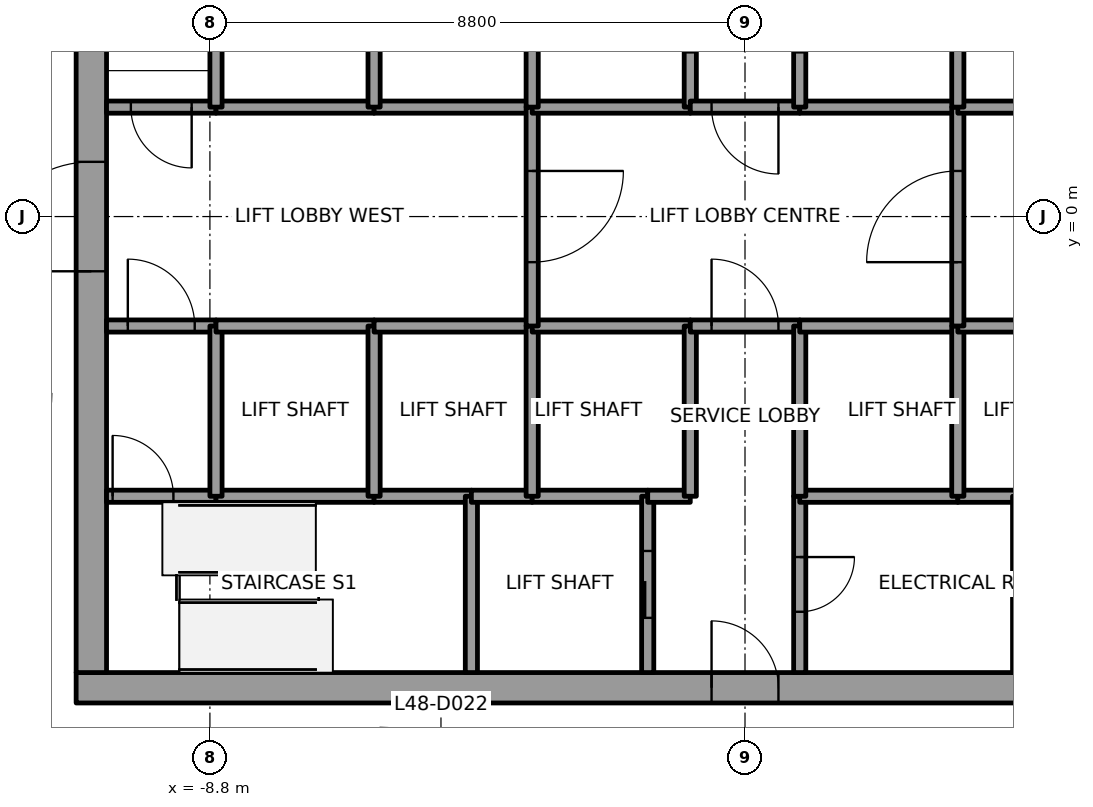
"""IFC4 building model, lengths in metres.
Left out: names, types, materials, properties, quantities, classifications, styles, units other than length and angle.
Written with IfcOpenShell. Run it as: python <this file> out.ifc"""

import sys

from ifc_helpers import new_model, si_unit, direction, frame, frame_2d, origin, place, context, subcontext, project, spatial, rectangle, extrude, element, fill, save


model = new_model("IFC4")
c1 = context("Model", 3, precision=1e-05, world=origin(), true_north=direction((0.0, 1.0)))
c2 = subcontext(c1, "Body", "Model", "MODEL_VIEW")
j1 = project(units=[si_unit("LENGTHUNIT", "METRE"), si_unit("PLANEANGLEUNIT", "RADIAN")], contexts=[c1])
p1 = place(None, origin())
s1 = spatial("IfcSite", under=j1, at=p1, CompositionType="ELEMENT")
p2 = place(p1, origin())
s2 = spatial("IfcBuilding", under=s1, at=p2, CompositionType="ELEMENT")
p3 = place(p2, frame((0.0, 0.0, 213.8)))
s3 = spatial("IfcBuildingStorey", under=s2, at=p3, CompositionType="ELEMENT", Elevation=213.8)
p4 = place(p3, frame((-11.0, -7.75, 0.0), z_axis=(0.0, 0.0, 1.0), x_axis=(1.0, 0.0, 0.0)))
e1 = element("IfcWall", 1, at=p4, inside=s3, PredefinedType="SHEAR", context=c2, shape_type="SweptSolid", body=[
    extrude(rectangle(XDim=22.0, YDim=0.5, at=frame_2d((11.0, 0.0))), origin(), (0.0, 0.0, 1.0), 6.0),
])
p5 = place(p4, frame((10.45, 0.0, 0.0)))
e2 = element("IfcOpeningElement", 2, at=p5, cuts=e1, PredefinedType="OPENING", context=c2, shape_type="SweptSolid", body=[
    extrude(rectangle(XDim=1.1, YDim=2.1, at=frame_2d((0.55, 1.05))), frame((0.0, 0.25, 0.0), z_axis=(0.0, -1.0, 0.0), x_axis=(1.0, 0.0, 0.0)), (0.0, 0.0, 1.0), 0.5),
])
p6 = place(p3, frame((-10.75, -7.5, 0.0), z_axis=(0.0, 0.0, 1.0), x_axis=(0.0, 1.0, 0.0)))
e3 = element("IfcWall", 3, at=p6, inside=s3, PredefinedType="SHEAR", context=c2, shape_type="SweptSolid", body=[
    extrude(rectangle(XDim=15.0, YDim=0.5, at=frame_2d((7.5, 0.0))), origin(), (0.0, 0.0, 1.0), 6.0),
])
p7 = place(p6, frame((6.6, 0.0, 0.0)))
e4 = element("IfcOpeningElement", 4, at=p7, cuts=e3, PredefinedType="OPENING", context=c2, shape_type="SweptSolid", body=[
    extrude(rectangle(XDim=1.8, YDim=2.1, at=frame_2d((0.9, 1.05))), frame((0.0, 0.25, 0.0), z_axis=(0.0, -1.0, 0.0), x_axis=(1.0, 0.0, 0.0)), (0.0, 0.0, 1.0), 0.5),
])
p8 = place(p3, frame((-10.5, -4.6, 0.0), z_axis=(0.0, 0.0, 1.0), x_axis=(1.0, 0.0, 0.0)))
e5 = element("IfcWall", 5, at=p8, inside=s3, PredefinedType="SOLIDWALL", context=c2, shape_type="SweptSolid", body=[
    extrude(rectangle(XDim=1.8, YDim=0.2, at=frame_2d((0.9, 0.0))), origin(), (0.0, 0.0, 1.0), 5.85),
])
p9 = place(p8, frame((0.1, 0.0, 0.0)))
e6 = element("IfcOpeningElement", 6, at=p9, cuts=e5, PredefinedType="OPENING", context=c2, shape_type="SweptSolid", body=[
    extrude(rectangle(XDim=1.0, YDim=2.1, at=frame_2d((0.5, 1.05))), frame((0.0, 0.1, 0.0), z_axis=(0.0, -1.0, 0.0), x_axis=(1.0, 0.0, 0.0)), (0.0, 0.0, 1.0), 0.2),
])
p10 = place(p3, frame((-10.5, -1.8, 0.0), z_axis=(0.0, 0.0, 1.0), x_axis=(1.0, 0.0, 0.0)))
e7 = element("IfcWall", 7, at=p10, inside=s3, PredefinedType="SOLIDWALL", context=c2, shape_type="SweptSolid", body=[
    extrude(rectangle(XDim=1.8, YDim=0.2, at=frame_2d((0.9, 0.0))), origin(), (0.0, 0.0, 1.0), 5.85),
])
p11 = place(p10, frame((0.35, 0.0, 0.0)))
e8 = element("IfcOpeningElement", 8, at=p11, cuts=e7, PredefinedType="OPENING", context=c2, shape_type="SweptSolid", body=[
    extrude(rectangle(XDim=1.1, YDim=2.1, at=frame_2d((0.55, 1.05))), frame((0.0, 0.1, 0.0), z_axis=(0.0, -1.0, 0.0), x_axis=(1.0, 0.0, 0.0)), (0.0, 0.0, 1.0), 0.2),
])
p12 = place(p3, frame((-8.7, 1.8, 0.0), z_axis=(0.0, 0.0, 1.0), x_axis=(-1.0, 0.0, 0.0)))
e9 = element("IfcWall", 9, at=p12, inside=s3, PredefinedType="SOLIDWALL", context=c2, shape_type="SweptSolid", body=[
    extrude(rectangle(XDim=1.8, YDim=0.2, at=frame_2d((0.9, 0.0))), origin(), (0.0, 0.0, 1.0), 5.85),
])
p13 = place(p12, frame((0.4, 0.0, 0.0)))
e10 = element("IfcOpeningElement", 10, at=p13, cuts=e9, PredefinedType="OPENING", context=c2, shape_type="SweptSolid", body=[
    extrude(rectangle(XDim=1.0, YDim=2.1, at=frame_2d((0.5, 1.05))), frame((0.0, 0.1, 0.0), z_axis=(0.0, -1.0, 0.0), x_axis=(1.0, 0.0, 0.0)), (0.0, 0.0, 1.0), 0.2),
])
p14 = place(p3, frame((-8.7, -4.6, 0.0), z_axis=(0.0, 0.0, 1.0), x_axis=(1.0, 0.0, 0.0)))
e11 = element("IfcWall", 11, at=p14, inside=s3, PredefinedType="SOLIDWALL", context=c2, shape_type="SweptSolid", body=[
    extrude(rectangle(XDim=2.6, YDim=0.2, at=frame_2d((1.3, 0.0))), origin(), (0.0, 0.0, 1.0), 5.85),
])
p15 = place(p3, frame((-8.7, -4.6, 0.0), z_axis=(0.0, 0.0, 1.0), x_axis=(0.0, 1.0, 0.0)))
e12 = element("IfcWall", 12, at=p15, inside=s3, PredefinedType="SOLIDWALL", context=c2, shape_type="SweptSolid", body=[
    extrude(rectangle(XDim=2.8, YDim=0.2, at=frame_2d((1.4, 0.0))), origin(), (0.0, 0.0, 1.0), 5.85),
])
for number, where, z_axis, x_axis in (
    (13, (-8.7, -1.8, 0.0), (0.0, 0.0, 1.0), (1.0, 0.0, 0.0)),
    (14, (-6.1, 1.8, 0.0), (0.0, 0.0, 1.0), (-1.0, 0.0, 0.0)),
):
    element("IfcWall", number, at=place(p3, frame(where, z_axis=z_axis, x_axis=x_axis)), inside=s3, PredefinedType="SOLIDWALL", context=c2, shape_type="SweptSolid", body=[
        extrude(rectangle(XDim=2.6, YDim=0.2, at=frame_2d((1.3, 0.0))), origin(), (0.0, 0.0, 1.0), 5.85),
    ])
p16 = place(p3, frame((-8.7, 1.8, 0.0), z_axis=(0.0, 0.0, 1.0), x_axis=(0.0, 1.0, 0.0)))
e15 = element("IfcWall", 15, at=p16, inside=s3, PredefinedType="SOLIDWALL", context=c2, shape_type="SweptSolid", body=[
    extrude(rectangle(XDim=2.8, YDim=0.2, at=frame_2d((1.4, 0.0))), origin(), (0.0, 0.0, 1.0), 5.85),
])
p17 = place(p3, frame((-6.1, -4.6, 0.0), z_axis=(0.0, 0.0, 1.0), x_axis=(1.0, 0.0, 0.0)))
e16 = element("IfcWall", 16, at=p17, inside=s3, PredefinedType="SOLIDWALL", context=c2, shape_type="SweptSolid", body=[
    extrude(rectangle(XDim=1.6, YDim=0.2, at=frame_2d((0.8, 0.0))), origin(), (0.0, 0.0, 1.0), 5.85),
])
p18 = place(p3, frame((-6.1, -4.6, 0.0), z_axis=(0.0, 0.0, 1.0), x_axis=(0.0, 1.0, 0.0)))
e17 = element("IfcWall", 17, at=p18, inside=s3, PredefinedType="SOLIDWALL", context=c2, shape_type="SweptSolid", body=[
    extrude(rectangle(XDim=2.8, YDim=0.2, at=frame_2d((1.4, 0.0))), origin(), (0.0, 0.0, 1.0), 5.85),
])
for number, where, z_axis, x_axis in (
    (18, (-6.1, -1.8, 0.0), (0.0, 0.0, 1.0), (1.0, 0.0, 0.0)),
    (19, (-3.5, 1.8, 0.0), (0.0, 0.0, 1.0), (-1.0, 0.0, 0.0)),
):
    element("IfcWall", number, at=place(p3, frame(where, z_axis=z_axis, x_axis=x_axis)), inside=s3, PredefinedType="SOLIDWALL", context=c2, shape_type="SweptSolid", body=[
        extrude(rectangle(XDim=2.6, YDim=0.2, at=frame_2d((1.3, 0.0))), origin(), (0.0, 0.0, 1.0), 5.85),
    ])
p19 = place(p3, frame((-6.1, 1.8, 0.0), z_axis=(0.0, 0.0, 1.0), x_axis=(0.0, 1.0, 0.0)))
e20 = element("IfcWall", 20, at=p19, inside=s3, PredefinedType="SOLIDWALL", context=c2, shape_type="SweptSolid", body=[
    extrude(rectangle(XDim=2.8, YDim=0.2, at=frame_2d((1.4, 0.0))), origin(), (0.0, 0.0, 1.0), 5.85),
])
p20 = place(p3, frame((-4.5, -4.6, 0.0), z_axis=(0.0, 0.0, 1.0), x_axis=(0.0, -1.0, 0.0)))
e21 = element("IfcWall", 21, at=p20, inside=s3, PredefinedType="SOLIDWALL", context=c2, shape_type="SweptSolid", body=[
    extrude(rectangle(XDim=2.9, YDim=0.2, at=frame_2d((1.45, 0.0))), origin(), (0.0, 0.0, 1.0), 5.85),
])
p21 = place(p3, frame((-4.5, -4.6, 0.0), z_axis=(0.0, 0.0, 1.0), x_axis=(1.0, 0.0, 0.0)))
e22 = element("IfcWall", 22, at=p21, inside=s3, PredefinedType="SOLIDWALL", context=c2, shape_type="SweptSolid", body=[
    extrude(rectangle(XDim=1.0, YDim=0.2, at=frame_2d((0.5, 0.0))), origin(), (0.0, 0.0, 1.0), 5.85),
])
p22 = place(p3, frame((-3.5, -4.6, 0.0), z_axis=(0.0, 0.0, 1.0), x_axis=(1.0, 0.0, 0.0)))
e23 = element("IfcWall", 23, at=p22, inside=s3, PredefinedType="SOLIDWALL", context=c2, shape_type="SweptSolid", body=[
    extrude(rectangle(XDim=1.9, YDim=0.2, at=frame_2d((0.95, 0.0))), origin(), (0.0, 0.0, 1.0), 5.85),
])
p23 = place(p3, frame((-3.5, -4.6, 0.0), z_axis=(0.0, 0.0, 1.0), x_axis=(0.0, 1.0, 0.0)))
e24 = element("IfcWall", 24, at=p23, inside=s3, PredefinedType="SOLIDWALL", context=c2, shape_type="SweptSolid", body=[
    extrude(rectangle(XDim=2.8, YDim=0.2, at=frame_2d((1.4, 0.0))), origin(), (0.0, 0.0, 1.0), 5.85),
])
p24 = place(p3, frame((-3.5, -1.8, 0.0), z_axis=(0.0, 0.0, 1.0), x_axis=(1.0, 0.0, 0.0)))
e25 = element("IfcWall", 25, at=p24, inside=s3, PredefinedType="SOLIDWALL", context=c2, shape_type="SweptSolid", body=[
    extrude(rectangle(XDim=2.6, YDim=0.2, at=frame_2d((1.3, 0.0))), origin(), (0.0, 0.0, 1.0), 5.85),
])
p25 = place(p3, frame((-3.5, 1.8, 0.0), z_axis=(0.0, 0.0, 1.0), x_axis=(0.0, -1.0, 0.0)))
e26 = element("IfcWall", 26, at=p25, inside=s3, PredefinedType="SOLIDWALL", context=c2, shape_type="SweptSolid", body=[
    extrude(rectangle(XDim=3.6, YDim=0.2, at=frame_2d((1.8, 0.0))), origin(), (0.0, 0.0, 1.0), 5.85),
])
p26 = place(p25, frame((1.05, 0.0, 0.0)))
e27 = element("IfcOpeningElement", 27, at=p26, cuts=e26, PredefinedType="OPENING", context=c2, shape_type="SweptSolid", body=[
    extrude(rectangle(XDim=1.5, YDim=2.1, at=frame_2d((0.75, 1.05))), frame((0.0, 0.1, 0.0), z_axis=(0.0, -1.0, 0.0), x_axis=(1.0, 0.0, 0.0)), (0.0, 0.0, 1.0), 0.2),
])
p27 = place(p3, frame((-0.9, 1.8, 0.0), z_axis=(0.0, 0.0, 1.0), x_axis=(-1.0, 0.0, 0.0)))
e28 = element("IfcWall", 28, at=p27, inside=s3, PredefinedType="SOLIDWALL", context=c2, shape_type="SweptSolid", body=[
    extrude(rectangle(XDim=2.6, YDim=0.2, at=frame_2d((1.3, 0.0))), origin(), (0.0, 0.0, 1.0), 5.85),
])
p28 = place(p3, frame((-3.5, 4.6, 0.0), z_axis=(0.0, 0.0, 1.0), x_axis=(0.0, -1.0, 0.0)))
e29 = element("IfcWall", 29, at=p28, inside=s3, PredefinedType="SOLIDWALL", context=c2, shape_type="SweptSolid", body=[
    extrude(rectangle(XDim=2.8, YDim=0.2, at=frame_2d((1.4, 0.0))), origin(), (0.0, 0.0, 1.0), 5.85),
])
p29 = place(p3, frame((-0.9, 1.8, 0.0), z_axis=(0.0, 0.0, 1.0), x_axis=(0.0, 1.0, 0.0)))
e30 = element("IfcWall", 30, at=p29, inside=s3, PredefinedType="SOLIDWALL", context=c2, shape_type="SweptSolid", body=[
    extrude(rectangle(XDim=3.0, YDim=0.2, at=frame_2d((1.5, 0.0))), origin(), (0.0, 0.0, 1.0), 5.85),
])
p30 = place(p29, frame((0.9, 0.0, 0.0)))
e31 = element("IfcOpeningElement", 31, at=p30, cuts=e30, PredefinedType="OPENING", context=c2, shape_type="SweptSolid", body=[
    extrude(rectangle(XDim=1.2, YDim=2.1, at=frame_2d((0.6, 1.05))), frame((0.0, 0.1, 0.0), z_axis=(0.0, -1.0, 0.0), x_axis=(1.0, 0.0, 0.0)), (0.0, 0.0, 1.0), 0.2),
])
p31 = place(p3, frame((-1.6, -7.5, 0.0), z_axis=(0.0, 0.0, 1.0), x_axis=(0.0, 1.0, 0.0)))
e32 = element("IfcWall", 32, at=p31, inside=s3, PredefinedType="SOLIDWALL", context=c2, shape_type="SweptSolid", body=[
    extrude(rectangle(XDim=2.9, YDim=0.2, at=frame_2d((1.45, 0.0))), origin(), (0.0, 0.0, 1.0), 5.85),
])
p32 = place(p31, frame((0.9, 0.0, 0.0)))
e33 = element("IfcOpeningElement", 33, at=p32, cuts=e32, PredefinedType="OPENING", context=c2, shape_type="SweptSolid", body=[
    extrude(rectangle(XDim=1.1, YDim=2.1, at=frame_2d((0.55, 1.05))), frame((0.0, 0.1, 0.0), z_axis=(0.0, -1.0, 0.0), x_axis=(1.0, 0.0, 0.0)), (0.0, 0.0, 1.0), 0.2),
])
p33 = place(p3, frame((-1.6, -4.6, 0.0), z_axis=(0.0, 0.0, 1.0), x_axis=(1.0, 0.0, 0.0)))
e34 = element("IfcWall", 34, at=p33, inside=s3, PredefinedType="SOLIDWALL", context=c2, shape_type="SweptSolid", body=[
    extrude(rectangle(XDim=0.7, YDim=0.2, at=frame_2d((0.35, 0.0))), origin(), (0.0, 0.0, 1.0), 5.85),
])
p34 = place(p3, frame((-0.9, -4.6, 0.0), z_axis=(0.0, 0.0, 1.0), x_axis=(0.0, 1.0, 0.0)))
e35 = element("IfcWall", 35, at=p34, inside=s3, PredefinedType="SOLIDWALL", context=c2, shape_type="SweptSolid", body=[
    extrude(rectangle(XDim=2.8, YDim=0.2, at=frame_2d((1.4, 0.0))), origin(), (0.0, 0.0, 1.0), 5.85),
])
p35 = place(p3, frame((-0.9, -1.8, 0.0), z_axis=(0.0, 0.0, 1.0), x_axis=(1.0, 0.0, 0.0)))
e36 = element("IfcWall", 36, at=p35, inside=s3, PredefinedType="SOLIDWALL", context=c2, shape_type="SweptSolid", body=[
    extrude(rectangle(XDim=1.8, YDim=0.2, at=frame_2d((0.9, 0.0))), origin(), (0.0, 0.0, 1.0), 5.85),
])
p36 = place(p35, frame((0.35, 0.0, 0.0)))
e37 = element("IfcOpeningElement", 37, at=p36, cuts=e36, PredefinedType="OPENING", context=c2, shape_type="SweptSolid", body=[
    extrude(rectangle(XDim=1.1, YDim=2.1, at=frame_2d((0.55, 1.05))), frame((0.0, 0.1, 0.0), z_axis=(0.0, -1.0, 0.0), x_axis=(1.0, 0.0, 0.0)), (0.0, 0.0, 1.0), 0.2),
])
p37 = place(p3, frame((0.9, 1.8, 0.0), z_axis=(0.0, 0.0, 1.0), x_axis=(-1.0, 0.0, 0.0)))
e38 = element("IfcWall", 38, at=p37, inside=s3, PredefinedType="SOLIDWALL", context=c2, shape_type="SweptSolid", body=[
    extrude(rectangle(XDim=1.8, YDim=0.2, at=frame_2d((0.9, 0.0))), origin(), (0.0, 0.0, 1.0), 5.85),
])
p38 = place(p37, frame((0.35, 0.0, 0.0)))
e39 = element("IfcOpeningElement", 39, at=p38, cuts=e38, PredefinedType="OPENING", context=c2, shape_type="SweptSolid", body=[
    extrude(rectangle(XDim=1.1, YDim=2.1, at=frame_2d((0.55, 1.05))), frame((0.0, 0.1, 0.0), z_axis=(0.0, -1.0, 0.0), x_axis=(1.0, 0.0, 0.0)), (0.0, 0.0, 1.0), 0.2),
])
p39 = place(p3, frame((0.9, -4.6, 0.0), z_axis=(0.0, 0.0, 1.0), x_axis=(0.0, -1.0, 0.0)))
e40 = element("IfcWall", 40, at=p39, inside=s3, PredefinedType="SOLIDWALL", context=c2, shape_type="SweptSolid", body=[
    extrude(rectangle(XDim=2.9, YDim=0.2, at=frame_2d((1.45, 0.0))), origin(), (0.0, 0.0, 1.0), 5.85),
])
p40 = place(p39, frame((1.0, 0.0, 0.0)))
e41 = element("IfcOpeningElement", 41, at=p40, cuts=e40, PredefinedType="OPENING", context=c2, shape_type="SweptSolid", body=[
    extrude(rectangle(XDim=0.9, YDim=2.1, at=frame_2d((0.45, 1.05))), frame((0.0, 0.1, 0.0), z_axis=(0.0, -1.0, 0.0), x_axis=(1.0, 0.0, 0.0)), (0.0, 0.0, 1.0), 0.2),
])
p41 = place(p3, frame((3.5, -4.6, 0.0), z_axis=(0.0, 0.0, 1.0), x_axis=(-1.0, 0.0, 0.0)))
e42 = element("IfcWall", 42, at=p41, inside=s3, PredefinedType="SOLIDWALL", context=c2, shape_type="SweptSolid", body=[
    extrude(rectangle(XDim=2.6, YDim=0.2, at=frame_2d((1.3, 0.0))), origin(), (0.0, 0.0, 1.0), 5.85),
])
p42 = place(p3, frame((0.9, -1.8, 0.0), z_axis=(0.0, 0.0, 1.0), x_axis=(0.0, -1.0, 0.0)))
e43 = element("IfcWall", 43, at=p42, inside=s3, PredefinedType="SOLIDWALL", context=c2, shape_type="SweptSolid", body=[
    extrude(rectangle(XDim=2.8, YDim=0.2, at=frame_2d((1.4, 0.0))), origin(), (0.0, 0.0, 1.0), 5.85),
])
for number, where, z_axis, x_axis in (
    (44, (0.9, -1.8, 0.0), (0.0, 0.0, 1.0), (1.0, 0.0, 0.0)),
    (45, (3.5, 1.8, 0.0), (0.0, 0.0, 1.0), (-1.0, 0.0, 0.0)),
):
    element("IfcWall", number, at=place(p3, frame(where, z_axis=z_axis, x_axis=x_axis)), inside=s3, PredefinedType="SOLIDWALL", context=c2, shape_type="SweptSolid", body=[
        extrude(rectangle(XDim=2.6, YDim=0.2, at=frame_2d((1.3, 0.0))), origin(), (0.0, 0.0, 1.0), 5.85),
    ])
p43 = place(p3, frame((0.9, 4.8, 0.0), z_axis=(0.0, 0.0, 1.0), x_axis=(0.0, -1.0, 0.0)))
e46 = element("IfcWall", 46, at=p43, inside=s3, PredefinedType="SOLIDWALL", context=c2, shape_type="SweptSolid", body=[
    extrude(rectangle(XDim=3.0, YDim=0.2, at=frame_2d((1.5, 0.0))), origin(), (0.0, 0.0, 1.0), 5.85),
])
p44 = place(p43, frame((0.9, 0.0, 0.0)))
e47 = element("IfcOpeningElement", 47, at=p44, cuts=e46, PredefinedType="OPENING", context=c2, shape_type="SweptSolid", body=[
    extrude(rectangle(XDim=1.2, YDim=2.1, at=frame_2d((0.6, 1.05))), frame((0.0, 0.1, 0.0), z_axis=(0.0, -1.0, 0.0), x_axis=(1.0, 0.0, 0.0)), (0.0, 0.0, 1.0), 0.2),
])
p45 = place(p3, frame((4.5, -4.6, 0.0), z_axis=(0.0, 0.0, 1.0), x_axis=(-1.0, 0.0, 0.0)))
e48 = element("IfcWall", 48, at=p45, inside=s3, PredefinedType="SOLIDWALL", context=c2, shape_type="SweptSolid", body=[
    extrude(rectangle(XDim=1.0, YDim=0.2, at=frame_2d((0.5, 0.0))), origin(), (0.0, 0.0, 1.0), 5.85),
])
p46 = place(p3, frame((3.5, -4.6, 0.0), z_axis=(0.0, 0.0, 1.0), x_axis=(0.0, 1.0, 0.0)))
e49 = element("IfcWall", 49, at=p46, inside=s3, PredefinedType="SOLIDWALL", context=c2, shape_type="SweptSolid", body=[
    extrude(rectangle(XDim=2.8, YDim=0.2, at=frame_2d((1.4, 0.0))), origin(), (0.0, 0.0, 1.0), 5.85),
])
p47 = place(p3, frame((3.5, -1.8, 0.0), z_axis=(0.0, 0.0, 1.0), x_axis=(1.0, 0.0, 0.0)))
e50 = element("IfcWall", 50, at=p47, inside=s3, PredefinedType="SOLIDWALL", context=c2, shape_type="SweptSolid", body=[
    extrude(rectangle(XDim=2.6, YDim=0.2, at=frame_2d((1.3, 0.0))), origin(), (0.0, 0.0, 1.0), 5.85),
])
p48 = place(p3, frame((3.5, -1.8, 0.0), z_axis=(0.0, 0.0, 1.0), x_axis=(0.0, 1.0, 0.0)))
e51 = element("IfcWall", 51, at=p48, inside=s3, PredefinedType="SOLIDWALL", context=c2, shape_type="SweptSolid", body=[
    extrude(rectangle(XDim=3.6, YDim=0.2, at=frame_2d((1.8, 0.0))), origin(), (0.0, 0.0, 1.0), 5.85),
])
p49 = place(p48, frame((1.05, 0.0, 0.0)))
e52 = element("IfcOpeningElement", 52, at=p49, cuts=e51, PredefinedType="OPENING", context=c2, shape_type="SweptSolid", body=[
    extrude(rectangle(XDim=1.5, YDim=2.1, at=frame_2d((0.75, 1.05))), frame((0.0, 0.1, 0.0), z_axis=(0.0, -1.0, 0.0), x_axis=(1.0, 0.0, 0.0)), (0.0, 0.0, 1.0), 0.2),
])
p50 = place(p3, frame((6.1, 1.8, 0.0), z_axis=(0.0, 0.0, 1.0), x_axis=(-1.0, 0.0, 0.0)))
e53 = element("IfcWall", 53, at=p50, inside=s3, PredefinedType="SOLIDWALL", context=c2, shape_type="SweptSolid", body=[
    extrude(rectangle(XDim=2.6, YDim=0.2, at=frame_2d((1.3, 0.0))), origin(), (0.0, 0.0, 1.0), 5.85),
])
p51 = place(p3, frame((3.5, 1.8, 0.0), z_axis=(0.0, 0.0, 1.0), x_axis=(0.0, 1.0, 0.0)))
e54 = element("IfcWall", 54, at=p51, inside=s3, PredefinedType="SOLIDWALL", context=c2, shape_type="SweptSolid", body=[
    extrude(rectangle(XDim=2.8, YDim=0.2, at=frame_2d((1.4, 0.0))), origin(), (0.0, 0.0, 1.0), 5.85),
])
p52 = place(p32, origin())
e55 = element("IfcDoor", 55, at=p52, inside=s3, OperationType="SLIDING_TO_RIGHT", PredefinedType="DOOR", context=c2, shape_type="SweptSolid", body=[
    extrude(rectangle(XDim=1.1, YDim=2.1, at=frame_2d((0.55, 1.05))), frame((0.0, 0.025, 0.0), z_axis=(0.0, -1.0, 0.0), x_axis=(1.0, 0.0, 0.0)), (0.0, 0.0, 1.0), 0.05),
])
fill(e33, e55)
p53 = place(p26, origin())
e56 = element("IfcDoor", 56, at=p53, inside=s3, OperationType="DOUBLE_DOOR_SINGLE_SWING", PredefinedType="DOOR", context=c2, shape_type="SweptSolid", body=[
    extrude(rectangle(XDim=1.5, YDim=2.1, at=frame_2d((0.75, 1.05))), frame((0.0, 0.025, 0.0), z_axis=(0.0, -1.0, 0.0), x_axis=(1.0, 0.0, 0.0)), (0.0, 0.0, 1.0), 0.05),
])
fill(e27, e56)
p54 = place(p49, origin())
e57 = element("IfcDoor", 57, at=p54, inside=s3, OperationType="DOUBLE_DOOR_SINGLE_SWING", PredefinedType="DOOR", context=c2, shape_type="SweptSolid", body=[
    extrude(rectangle(XDim=1.5, YDim=2.1, at=frame_2d((0.75, 1.05))), frame((0.0, 0.025, 0.0), z_axis=(0.0, -1.0, 0.0), x_axis=(1.0, 0.0, 0.0)), (0.0, 0.0, 1.0), 0.05),
])
fill(e52, e57)
p55 = place(p11, origin())
e58 = element("IfcDoor", 58, at=p55, inside=s3, OperationType="SINGLE_SWING_RIGHT", PredefinedType="DOOR", context=c2, shape_type="SweptSolid", body=[
    extrude(rectangle(XDim=1.1, YDim=2.1, at=frame_2d((0.55, 1.05))), frame((0.0, 0.025, 0.0), z_axis=(0.0, -1.0, 0.0), x_axis=(1.0, 0.0, 0.0)), (0.0, 0.0, 1.0), 0.05),
])
fill(e8, e58)
p56 = place(p38, origin())
e59 = element("IfcDoor", 59, at=p56, inside=s3, OperationType="SINGLE_SWING_LEFT", PredefinedType="DOOR", context=c2, shape_type="SweptSolid", body=[
    extrude(rectangle(XDim=1.1, YDim=2.1, at=frame_2d((0.55, 1.05))), frame((0.0, 0.025, 0.0), z_axis=(0.0, -1.0, 0.0), x_axis=(1.0, 0.0, 0.0)), (0.0, 0.0, 1.0), 0.05),
])
fill(e39, e59)
p57 = place(p36, origin())
e60 = element("IfcDoor", 60, at=p57, inside=s3, OperationType="SINGLE_SWING_RIGHT", PredefinedType="DOOR", context=c2, shape_type="SweptSolid", body=[
    extrude(rectangle(XDim=1.1, YDim=2.1, at=frame_2d((0.55, 1.05))), frame((0.0, 0.025, 0.0), z_axis=(0.0, -1.0, 0.0), x_axis=(1.0, 0.0, 0.0)), (0.0, 0.0, 1.0), 0.05),
])
fill(e37, e60)
p58 = place(p13, origin())
e61 = element("IfcDoor", 61, at=p58, inside=s3, OperationType="SINGLE_SWING_RIGHT", PredefinedType="DOOR", context=c2, shape_type="SweptSolid", body=[
    extrude(rectangle(XDim=1.0, YDim=2.1, at=frame_2d((0.5, 1.05))), frame((0.0, 0.025, 0.0), z_axis=(0.0, -1.0, 0.0), x_axis=(1.0, 0.0, 0.0)), (0.0, 0.0, 1.0), 0.05),
])
fill(e10, e61)
p59 = place(p9, origin())
e62 = element("IfcDoor", 62, at=p59, inside=s3, OperationType="SINGLE_SWING_LEFT", PredefinedType="DOOR", context=c2, shape_type="SweptSolid", body=[
    extrude(rectangle(XDim=1.0, YDim=2.1, at=frame_2d((0.5, 1.05))), frame((0.0, 0.025, 0.0), z_axis=(0.0, -1.0, 0.0), x_axis=(1.0, 0.0, 0.0)), (0.0, 0.0, 1.0), 0.05),
])
fill(e6, e62)
p60 = place(p40, origin())
e63 = element("IfcDoor", 63, at=p60, inside=s3, OperationType="SINGLE_SWING_RIGHT", PredefinedType="DOOR", context=c2, shape_type="SweptSolid", body=[
    extrude(rectangle(XDim=0.9, YDim=2.1, at=frame_2d((0.45, 1.05))), frame((0.0, 0.025, 0.0), z_axis=(0.0, -1.0, 0.0), x_axis=(1.0, 0.0, 0.0)), (0.0, 0.0, 1.0), 0.05),
])
fill(e41, e63)
p61 = place(p7, origin())
e64 = element("IfcDoor", 64, at=p61, inside=s3, OperationType="DOUBLE_DOOR_SINGLE_SWING", PredefinedType="DOOR", context=c2, shape_type="SweptSolid", body=[
    extrude(rectangle(XDim=1.8, YDim=2.1, at=frame_2d((0.9, 1.05))), frame((0.0, 0.025, 0.0), z_axis=(0.0, -1.0, 0.0), x_axis=(1.0, 0.0, 0.0)), (0.0, 0.0, 1.0), 0.05),
])
fill(e4, e64)
p62 = place(p5, origin())
e65 = element("IfcDoor", 65, at=p62, inside=s3, OperationType="SINGLE_SWING_LEFT", PredefinedType="DOOR", context=c2, shape_type="SweptSolid", body=[
    extrude(rectangle(XDim=1.1, YDim=2.1, at=frame_2d((0.55, 1.05))), frame((0.0, 0.025, 0.0), z_axis=(0.0, -1.0, 0.0), x_axis=(1.0, 0.0, 0.0)), (0.0, 0.0, 1.0), 0.05),
])
fill(e2, e65)
save(model, sys.argv[1])
